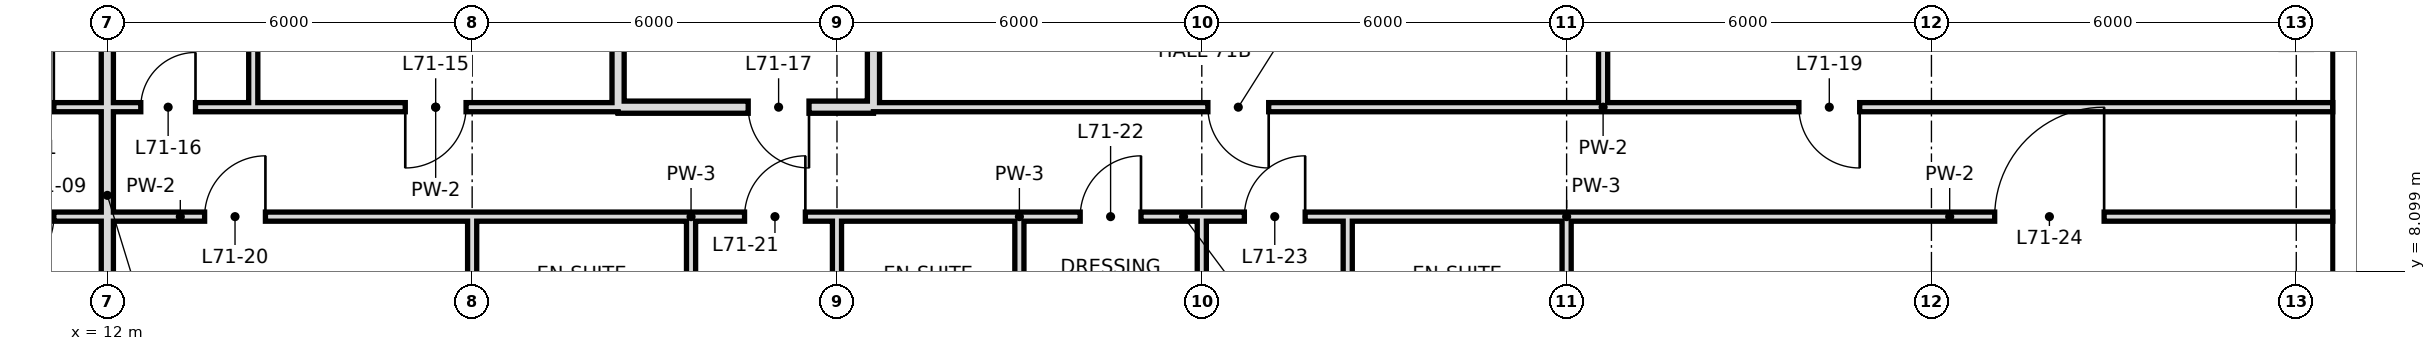
"""IFC4 building model, lengths in metres.
Left out: names, types, materials, properties, quantities, classifications, styles, units other than length and angle.
Written with IfcOpenShell. Run it as: python <this file> out.ifc"""

import sys

from ifc_helpers import new_model, si_unit, direction, frame, frame_2d, origin, place, context, subcontext, project, spatial, rectangle, extrude, element, fill, save


model = new_model("IFC4")
c1 = context("Model", 3, precision=1e-05, world=origin(), true_north=direction((0.0, 1.0)))
c2 = subcontext(c1, "Body", "Model", "MODEL_VIEW")
j1 = project(units=[si_unit("LENGTHUNIT", "METRE"), si_unit("PLANEANGLEUNIT", "RADIAN")], contexts=[c1])
p1 = place(None, origin())
s1 = spatial("IfcSite", under=j1, at=p1, CompositionType="ELEMENT")
p2 = place(p1, origin())
s2 = spatial("IfcBuilding", under=s1, at=p2, CompositionType="ELEMENT")
p3 = place(p2, frame((0.0, 0.0, 301.6)))
s3 = spatial("IfcBuildingStorey", under=s2, at=p3, CompositionType="ELEMENT", Elevation=301.6)
p4 = place(p3, frame((12.0, 0.0, 0.0), z_axis=(0.0, 0.0, 1.0), x_axis=(0.0, 1.0, 0.0)))
e1 = element("IfcWall", 1, at=p4, inside=s3, PredefinedType="SOLIDWALL", context=c2, shape_type="SweptSolid", body=[
    extrude(rectangle(XDim=18.7, YDim=0.2, at=frame_2d((9.35, 0.0))), origin(), (0.0, 0.0, 1.0), 2.72),
])
p5 = place(p3, frame((14.4, 10.8, 0.0), z_axis=(0.0, 0.0, 1.0), x_axis=(0.0, 1.0, 0.0)))
e2 = element("IfcWall", 2, at=p5, inside=s3, PredefinedType="PARTITIONING", context=c2, shape_type="SweptSolid", body=[
    extrude(rectangle(XDim=7.9, YDim=0.15, at=frame_2d((3.95, 0.0))), origin(), (0.0, 0.0, 1.0), 3.42),
])
p6 = place(p3, frame((18.0, 6.0, 0.0), z_axis=(0.0, 0.0, 1.0), x_axis=(0.0, 1.0, 0.0)))
e3 = element("IfcWall", 3, at=p6, inside=s3, PredefinedType="PARTITIONING", context=c2, shape_type="SweptSolid", body=[
    extrude(rectangle(XDim=3.0, YDim=0.15, at=frame_2d((1.5, 0.0))), origin(), (0.0, 0.0, 1.0), 2.72),
])
p7 = place(p3, frame((20.4, 10.8, 0.0), z_axis=(0.0, 0.0, 1.0), x_axis=(0.0, 1.0, 0.0)))
e4 = element("IfcWall", 4, at=p7, inside=s3, PredefinedType="SOLIDWALL", context=c2, shape_type="SweptSolid", body=[
    extrude(rectangle(XDim=7.9, YDim=0.2, at=frame_2d((3.95, 0.0))), origin(), (0.0, 0.0, 1.0), 2.72),
])
p8 = place(p3, frame((21.6, 6.0, 0.0), z_axis=(0.0, 0.0, 1.0), x_axis=(0.0, 1.0, 0.0)))
e5 = element("IfcWall", 5, at=p8, inside=s3, PredefinedType="PARTITIONING", context=c2, shape_type="SweptSolid", body=[
    extrude(rectangle(XDim=3.0, YDim=0.15, at=frame_2d((1.5, 0.0))), origin(), (0.0, 0.0, 1.0), 3.42),
])
p9 = place(p3, frame((24.0, 6.0, 0.0), z_axis=(0.0, 0.0, 1.0), x_axis=(0.0, 1.0, 0.0)))
e6 = element("IfcWall", 6, at=p9, inside=s3, PredefinedType="PARTITIONING", context=c2, shape_type="SweptSolid", body=[
    extrude(rectangle(XDim=3.0, YDim=0.15, at=frame_2d((1.5, 0.0))), origin(), (0.0, 0.0, 1.0), 2.72),
])
p10 = place(p3, frame((24.6, 10.8, 0.0), z_axis=(0.0, 0.0, 1.0), x_axis=(0.0, 1.0, 0.0)))
e7 = element("IfcWall", 7, at=p10, inside=s3, PredefinedType="SOLIDWALL", context=c2, shape_type="SweptSolid", body=[
    extrude(rectangle(XDim=7.9, YDim=0.2, at=frame_2d((3.95, 0.0))), origin(), (0.0, 0.0, 1.0), 2.72),
])
p11 = place(p3, frame((27.0, 6.0, 0.0), z_axis=(0.0, 0.0, 1.0), x_axis=(0.0, 1.0, 0.0)))
e8 = element("IfcWall", 8, at=p11, inside=s3, PredefinedType="PARTITIONING", context=c2, shape_type="SweptSolid", body=[
    extrude(rectangle(XDim=3.0, YDim=0.15, at=frame_2d((1.5, 0.0))), origin(), (0.0, 0.0, 1.0), 3.42),
])
p12 = place(p3, frame((30.0, -0.6, 0.0), z_axis=(0.0, 0.0, 1.0), x_axis=(0.0, 1.0, 0.0)))
e9 = element("IfcWall", 9, at=p12, inside=s3, PredefinedType="PARTITIONING", context=c2, shape_type="SweptSolid", body=[
    extrude(rectangle(XDim=9.6, YDim=0.15, at=frame_2d((4.8, 0.0))), origin(), (0.0, 0.0, 1.0), 2.72),
])
p13 = place(p3, frame((32.4, 6.0, 0.0), z_axis=(0.0, 0.0, 1.0), x_axis=(0.0, 1.0, 0.0)))
e10 = element("IfcWall", 10, at=p13, inside=s3, PredefinedType="PARTITIONING", context=c2, shape_type="SweptSolid", body=[
    extrude(rectangle(XDim=3.0, YDim=0.15, at=frame_2d((1.5, 0.0))), origin(), (0.0, 0.0, 1.0), 3.42),
])
p14 = place(p3, frame((36.0, 6.0, 0.0), z_axis=(0.0, 0.0, 1.0), x_axis=(0.0, 1.0, 0.0)))
e11 = element("IfcWall", 11, at=p14, inside=s3, PredefinedType="PARTITIONING", context=c2, shape_type="SweptSolid", body=[
    extrude(rectangle(XDim=3.0, YDim=0.15, at=frame_2d((1.5, 0.0))), origin(), (0.0, 0.0, 1.0), 2.72),
])
p15 = place(p3, frame((36.6, 10.8, 0.0), z_axis=(0.0, 0.0, 1.0), x_axis=(0.0, 1.0, 0.0)))
e12 = element("IfcWall", 12, at=p15, inside=s3, PredefinedType="PARTITIONING", context=c2, shape_type="SweptSolid", body=[
    extrude(rectangle(XDim=7.9, YDim=0.15, at=frame_2d((3.95, 0.0))), origin(), (0.0, 0.0, 1.0), 3.42),
])
p16 = place(p3, frame((20.4, 10.8, 0.0), z_axis=(0.0, 0.0, 1.0), x_axis=(1.0, 0.0, 0.0)))
e13 = element("IfcWall", 13, at=p16, inside=s3, PredefinedType="SOLIDWALL", context=c2, shape_type="SweptSolid", body=[
    extrude(rectangle(XDim=4.2, YDim=0.2, at=frame_2d((2.1, 0.0))), origin(), (0.0, 0.0, 1.0), 2.72),
])
p17 = place(p16, frame((2.14, 0.0, 0.0)))
e14 = element("IfcOpeningElement", 14, at=p17, cuts=e13, PredefinedType="OPENING", context=c2, shape_type="SweptSolid", body=[
    extrude(rectangle(XDim=1.0, YDim=2.4, at=frame_2d((0.5, 1.2))), frame((0.0, 0.11, 0.0), z_axis=(0.0, -1.0, 0.0), x_axis=(1.0, 0.0, 0.0)), (0.0, 0.0, 1.0), 0.22),
])
p18 = place(p3, frame((-10.2, 10.8, 0.0), z_axis=(0.0, 0.0, 1.0), x_axis=(1.0, 0.0, 0.0)))
e15 = element("IfcWall", 15, at=p18, inside=s3, PredefinedType="PARTITIONING", context=c2, shape_type="SweptSolid", body=[
    extrude(rectangle(XDim=22.2, YDim=0.15, at=frame_2d((11.1, 0.0))), origin(), (0.0, 0.0, 1.0), 3.42),
])
p19 = place(p18, frame((20.32, 0.0, 0.0)))
e16 = element("IfcOpeningElement", 16, at=p19, cuts=e15, PredefinedType="OPENING", context=c2, shape_type="SweptSolid", body=[
    extrude(rectangle(XDim=1.0, YDim=2.4, at=frame_2d((0.5, 1.2))), frame((0.0, 0.085, 0.0), z_axis=(0.0, -1.0, 0.0), x_axis=(1.0, 0.0, 0.0)), (0.0, 0.0, 1.0), 0.17),
])
p20 = place(p18, frame((3.4, 0.0, 0.0)))
e17 = element("IfcOpeningElement", 17, at=p20, cuts=e15, PredefinedType="OPENING", context=c2, shape_type="SweptSolid", body=[
    extrude(rectangle(XDim=1.0, YDim=2.4, at=frame_2d((0.5, 1.2))), frame((0.0, 0.085, 0.0), z_axis=(0.0, -1.0, 0.0), x_axis=(1.0, 0.0, 0.0)), (0.0, 0.0, 1.0), 0.17),
])
p21 = place(p18, frame((10.84, 0.0, 0.0)))
e18 = element("IfcOpeningElement", 18, at=p21, cuts=e15, PredefinedType="OPENING", context=c2, shape_type="SweptSolid", body=[
    extrude(rectangle(XDim=1.0, YDim=2.4, at=frame_2d((0.5, 1.2))), frame((0.0, 0.085, 0.0), z_axis=(0.0, -1.0, 0.0), x_axis=(1.0, 0.0, 0.0)), (0.0, 0.0, 1.0), 0.17),
])
p22 = place(p3, frame((14.4, 10.8, 0.0), z_axis=(0.0, 0.0, 1.0), x_axis=(1.0, 0.0, 0.0)))
e19 = element("IfcWall", 19, at=p22, inside=s3, PredefinedType="PARTITIONING", context=c2, shape_type="SweptSolid", body=[
    extrude(rectangle(XDim=6.0, YDim=0.15, at=frame_2d((3.0, 0.0))), origin(), (0.0, 0.0, 1.0), 3.42),
])
p23 = place(p22, frame((2.5, 0.0, 0.0)))
e20 = element("IfcOpeningElement", 20, at=p23, cuts=e19, PredefinedType="OPENING", context=c2, shape_type="SweptSolid", body=[
    extrude(rectangle(XDim=1.0, YDim=2.4, at=frame_2d((0.5, 1.2))), frame((0.0, 0.085, 0.0), z_axis=(0.0, -1.0, 0.0), x_axis=(1.0, 0.0, 0.0)), (0.0, 0.0, 1.0), 0.17),
])
p24 = place(p3, frame((24.6, 10.8, 0.0), z_axis=(0.0, 0.0, 1.0), x_axis=(1.0, 0.0, 0.0)))
e21 = element("IfcWall", 21, at=p24, inside=s3, PredefinedType="PARTITIONING", context=c2, shape_type="SweptSolid", body=[
    extrude(rectangle(XDim=24.0, YDim=0.15, at=frame_2d((12.0, 0.0))), origin(), (0.0, 0.0, 1.0), 3.42),
])
p25 = place(p24, frame((5.5, 0.0, 0.0)))
e22 = element("IfcOpeningElement", 22, at=p25, cuts=e21, PredefinedType="OPENING", context=c2, shape_type="SweptSolid", body=[
    extrude(rectangle(XDim=1.0, YDim=2.4, at=frame_2d((0.5, 1.2))), frame((0.0, 0.085, 0.0), z_axis=(0.0, -1.0, 0.0), x_axis=(1.0, 0.0, 0.0)), (0.0, 0.0, 1.0), 0.17),
])
p26 = place(p24, frame((15.22, 0.0, 0.0)))
e23 = element("IfcOpeningElement", 23, at=p26, cuts=e21, PredefinedType="OPENING", context=c2, shape_type="SweptSolid", body=[
    extrude(rectangle(XDim=1.0, YDim=2.4, at=frame_2d((0.5, 1.2))), frame((0.0, 0.085, 0.0), z_axis=(0.0, -1.0, 0.0), x_axis=(1.0, 0.0, 0.0)), (0.0, 0.0, 1.0), 0.17),
])
p27 = place(p3, frame((12.0, 10.8, 0.0), z_axis=(0.0, 0.0, 1.0), x_axis=(1.0, 0.0, 0.0)))
e24 = element("IfcWall", 24, at=p27, inside=s3, PredefinedType="PARTITIONING", context=c2, shape_type="SweptSolid", body=[
    extrude(rectangle(XDim=2.4, YDim=0.15, at=frame_2d((1.2, 0.0))), origin(), (0.0, 0.0, 1.0), 3.42),
])
p28 = place(p27, frame((0.55, 0.0, 0.0)))
e25 = element("IfcOpeningElement", 25, at=p28, cuts=e24, PredefinedType="OPENING", context=c2, shape_type="SweptSolid", body=[
    extrude(rectangle(XDim=0.9, YDim=2.4, at=frame_2d((0.45, 1.2))), frame((0.0, 0.085, 0.0), z_axis=(0.0, -1.0, 0.0), x_axis=(1.0, 0.0, 0.0)), (0.0, 0.0, 1.0), 0.17),
])
p29 = place(p3, frame((8.4, 9.0, 0.0), z_axis=(0.0, 0.0, 1.0), x_axis=(1.0, 0.0, 0.0)))
e26 = element("IfcWall", 26, at=p29, inside=s3, PredefinedType="PARTITIONING", context=c2, shape_type="SweptSolid", body=[
    extrude(rectangle(XDim=9.6, YDim=0.15, at=frame_2d((4.8, 0.0))), origin(), (0.0, 0.0, 1.0), 3.42),
])
p30 = place(p29, frame((1.72, 0.0, 0.0)))
e27 = element("IfcOpeningElement", 27, at=p30, cuts=e26, PredefinedType="OPENING", context=c2, shape_type="SweptSolid", body=[
    extrude(rectangle(XDim=1.0, YDim=2.4, at=frame_2d((0.5, 1.2))), frame((0.0, 0.085, 0.0), z_axis=(0.0, -1.0, 0.0), x_axis=(1.0, 0.0, 0.0)), (0.0, 0.0, 1.0), 0.17),
])
p31 = place(p29, frame((5.2, 0.0, 0.0)))
e28 = element("IfcOpeningElement", 28, at=p31, cuts=e26, PredefinedType="OPENING", context=c2, shape_type="SweptSolid", body=[
    extrude(rectangle(XDim=1.0, YDim=2.4, at=frame_2d((0.5, 1.2))), frame((0.0, 0.085, 0.0), z_axis=(0.0, -1.0, 0.0), x_axis=(1.0, 0.0, 0.0)), (0.0, 0.0, 1.0), 0.17),
])
p32 = place(p3, frame((21.6, 9.0, 0.0), z_axis=(0.0, 0.0, 1.0), x_axis=(1.0, 0.0, 0.0)))
e29 = element("IfcWall", 29, at=p32, inside=s3, PredefinedType="PARTITIONING", context=c2, shape_type="SweptSolid", body=[
    extrude(rectangle(XDim=2.4, YDim=0.15, at=frame_2d((1.2, 0.0))), origin(), (0.0, 0.0, 1.0), 3.42),
])
p33 = place(p32, frame((0.88, 0.0, 0.0)))
e30 = element("IfcOpeningElement", 30, at=p33, cuts=e29, PredefinedType="OPENING", context=c2, shape_type="SweptSolid", body=[
    extrude(rectangle(XDim=1.0, YDim=2.4, at=frame_2d((0.5, 1.2))), frame((0.0, 0.085, 0.0), z_axis=(0.0, -1.0, 0.0), x_axis=(1.0, 0.0, 0.0)), (0.0, 0.0, 1.0), 0.17),
])
p34 = place(p3, frame((27.0, 9.0, 0.0), z_axis=(0.0, 0.0, 1.0), x_axis=(1.0, 0.0, 0.0)))
e31 = element("IfcWall", 31, at=p34, inside=s3, PredefinedType="PARTITIONING", context=c2, shape_type="SweptSolid", body=[
    extrude(rectangle(XDim=5.4, YDim=0.15, at=frame_2d((2.7, 0.0))), origin(), (0.0, 0.0, 1.0), 3.42),
])
p35 = place(p34, frame((1.0, 0.0, 0.0)))
e32 = element("IfcOpeningElement", 32, at=p35, cuts=e31, PredefinedType="OPENING", context=c2, shape_type="SweptSolid", body=[
    extrude(rectangle(XDim=1.0, YDim=2.4, at=frame_2d((0.5, 1.2))), frame((0.0, 0.085, 0.0), z_axis=(0.0, -1.0, 0.0), x_axis=(1.0, 0.0, 0.0)), (0.0, 0.0, 1.0), 0.17),
])
p36 = place(p34, frame((3.7, 0.0, 0.0)))
e33 = element("IfcOpeningElement", 33, at=p36, cuts=e31, PredefinedType="OPENING", context=c2, shape_type="SweptSolid", body=[
    extrude(rectangle(XDim=1.0, YDim=2.4, at=frame_2d((0.5, 1.2))), frame((0.0, 0.085, 0.0), z_axis=(0.0, -1.0, 0.0), x_axis=(1.0, 0.0, 0.0)), (0.0, 0.0, 1.0), 0.17),
])
p37 = place(p3, frame((36.0, 9.0, 0.0), z_axis=(0.0, 0.0, 1.0), x_axis=(1.0, 0.0, 0.0)))
e34 = element("IfcWall", 34, at=p37, inside=s3, PredefinedType="PARTITIONING", context=c2, shape_type="SweptSolid", body=[
    extrude(rectangle(XDim=12.6, YDim=0.15, at=frame_2d((6.3, 0.0))), origin(), (0.0, 0.0, 1.0), 3.42),
])
p38 = place(p37, frame((7.04, 0.0, 0.0)))
e35 = element("IfcOpeningElement", 35, at=p38, cuts=e34, PredefinedType="OPENING", context=c2, shape_type="SweptSolid", body=[
    extrude(rectangle(XDim=1.8, YDim=2.4, at=frame_2d((0.9, 1.2))), frame((0.0, 0.085, 0.0), z_axis=(0.0, -1.0, 0.0), x_axis=(1.0, 0.0, 0.0)), (0.0, 0.0, 1.0), 0.17),
])
p39 = place(p3, frame((18.0, 9.0, 0.0), z_axis=(0.0, 0.0, 1.0), x_axis=(1.0, 0.0, 0.0)))
e36 = element("IfcWall", 36, at=p39, inside=s3, PredefinedType="PARTITIONING", context=c2, shape_type="SweptSolid", body=[
    extrude(rectangle(XDim=3.6, YDim=0.15, at=frame_2d((1.8, 0.0))), origin(), (0.0, 0.0, 1.0), 3.42),
])
p40 = place(p3, frame((24.0, 9.0, 0.0), z_axis=(0.0, 0.0, 1.0), x_axis=(1.0, 0.0, 0.0)))
e37 = element("IfcWall", 37, at=p40, inside=s3, PredefinedType="PARTITIONING", context=c2, shape_type="SweptSolid", body=[
    extrude(rectangle(XDim=3.0, YDim=0.15, at=frame_2d((1.5, 0.0))), origin(), (0.0, 0.0, 1.0), 3.42),
])
p41 = place(p3, frame((32.4, 9.0, 0.0), z_axis=(0.0, 0.0, 1.0), x_axis=(1.0, 0.0, 0.0)))
e38 = element("IfcWall", 38, at=p41, inside=s3, PredefinedType="PARTITIONING", context=c2, shape_type="SweptSolid", body=[
    extrude(rectangle(XDim=3.6, YDim=0.15, at=frame_2d((1.8, 0.0))), origin(), (0.0, 0.0, 1.0), 3.42),
])
p42 = place(p19, frame((1.0, 0.0, 0.0), z_axis=(0.0, 0.0, 1.0), x_axis=(-1.0, 0.0, 0.0)))
e39 = element("IfcDoor", 39, at=p42, inside=s3, OperationType="SINGLE_SWING_LEFT", PredefinedType="DOOR", context=c2, shape_type="SweptSolid", body=[
    extrude(rectangle(XDim=1.0, YDim=2.4, at=frame_2d((0.5, 1.2))), frame((0.0, 0.025, 0.0), z_axis=(0.0, -1.0, 0.0), x_axis=(1.0, 0.0, 0.0)), (0.0, 0.0, 1.0), 0.05),
])
fill(e16, e39)
p43 = place(p30, frame((1.0, 0.0, 0.0), z_axis=(0.0, 0.0, 1.0), x_axis=(-1.0, 0.0, 0.0)))
e40 = element("IfcDoor", 40, at=p43, inside=s3, OperationType="SINGLE_SWING_RIGHT", PredefinedType="DOOR", context=c2, shape_type="SweptSolid", body=[
    extrude(rectangle(XDim=1.0, YDim=2.4, at=frame_2d((0.5, 1.2))), frame((0.0, 0.025, 0.0), z_axis=(0.0, -1.0, 0.0), x_axis=(1.0, 0.0, 0.0)), (0.0, 0.0, 1.0), 0.05),
])
fill(e27, e40)
p44 = place(p23, frame((1.0, 0.0, 0.0), z_axis=(0.0, 0.0, 1.0), x_axis=(-1.0, 0.0, 0.0)))
e41 = element("IfcDoor", 41, at=p44, inside=s3, OperationType="SINGLE_SWING_RIGHT", PredefinedType="DOOR", context=c2, shape_type="SweptSolid", body=[
    extrude(rectangle(XDim=1.0, YDim=2.4, at=frame_2d((0.5, 1.2))), frame((0.0, 0.025, 0.0), z_axis=(0.0, -1.0, 0.0), x_axis=(1.0, 0.0, 0.0)), (0.0, 0.0, 1.0), 0.05),
])
fill(e20, e41)
p45 = place(p28, frame((0.9, 0.0, 0.0), z_axis=(0.0, 0.0, 1.0), x_axis=(-1.0, 0.0, 0.0)))
e42 = element("IfcDoor", 42, at=p45, inside=s3, OperationType="SINGLE_SWING_LEFT", PredefinedType="DOOR", context=c2, shape_type="SweptSolid", body=[
    extrude(rectangle(XDim=0.9, YDim=2.4, at=frame_2d((0.45, 1.2))), frame((0.0, 0.025, 0.0), z_axis=(0.0, -1.0, 0.0), x_axis=(1.0, 0.0, 0.0)), (0.0, 0.0, 1.0), 0.05),
])
fill(e25, e42)
p46 = place(p17, origin())
e43 = element("IfcDoor", 43, at=p46, inside=s3, OperationType="SINGLE_SWING_RIGHT", PredefinedType="DOOR", context=c2, shape_type="SweptSolid", body=[
    extrude(rectangle(XDim=1.0, YDim=2.4, at=frame_2d((0.5, 1.2))), frame((0.0, 0.025, 0.0), z_axis=(0.0, -1.0, 0.0), x_axis=(1.0, 0.0, 0.0)), (0.0, 0.0, 1.0), 0.05),
])
fill(e14, e43)
p47 = place(p25, origin())
e44 = element("IfcDoor", 44, at=p47, inside=s3, OperationType="SINGLE_SWING_RIGHT", PredefinedType="DOOR", context=c2, shape_type="SweptSolid", body=[
    extrude(rectangle(XDim=1.0, YDim=2.4, at=frame_2d((0.5, 1.2))), frame((0.0, 0.025, 0.0), z_axis=(0.0, -1.0, 0.0), x_axis=(1.0, 0.0, 0.0)), (0.0, 0.0, 1.0), 0.05),
])
fill(e22, e44)
p48 = place(p26, origin())
e45 = element("IfcDoor", 45, at=p48, inside=s3, OperationType="SINGLE_SWING_RIGHT", PredefinedType="DOOR", context=c2, shape_type="SweptSolid", body=[
    extrude(rectangle(XDim=1.0, YDim=2.4, at=frame_2d((0.5, 1.2))), frame((0.0, 0.025, 0.0), z_axis=(0.0, -1.0, 0.0), x_axis=(1.0, 0.0, 0.0)), (0.0, 0.0, 1.0), 0.05),
])
fill(e23, e45)
p49 = place(p31, frame((1.0, 0.0, 0.0), z_axis=(0.0, 0.0, 1.0), x_axis=(-1.0, 0.0, 0.0)))
e46 = element("IfcDoor", 46, at=p49, inside=s3, OperationType="SINGLE_SWING_LEFT", PredefinedType="DOOR", context=c2, shape_type="SweptSolid", body=[
    extrude(rectangle(XDim=1.0, YDim=2.4, at=frame_2d((0.5, 1.2))), frame((0.0, 0.025, 0.0), z_axis=(0.0, -1.0, 0.0), x_axis=(1.0, 0.0, 0.0)), (0.0, 0.0, 1.0), 0.05),
])
fill(e28, e46)
p50 = place(p33, frame((1.0, 0.0, 0.0), z_axis=(0.0, 0.0, 1.0), x_axis=(-1.0, 0.0, 0.0)))
e47 = element("IfcDoor", 47, at=p50, inside=s3, OperationType="SINGLE_SWING_LEFT", PredefinedType="DOOR", context=c2, shape_type="SweptSolid", body=[
    extrude(rectangle(XDim=1.0, YDim=2.4, at=frame_2d((0.5, 1.2))), frame((0.0, 0.025, 0.0), z_axis=(0.0, -1.0, 0.0), x_axis=(1.0, 0.0, 0.0)), (0.0, 0.0, 1.0), 0.05),
])
fill(e30, e47)
p51 = place(p35, frame((1.0, 0.0, 0.0), z_axis=(0.0, 0.0, 1.0), x_axis=(-1.0, 0.0, 0.0)))
e48 = element("IfcDoor", 48, at=p51, inside=s3, OperationType="SINGLE_SWING_LEFT", PredefinedType="DOOR", context=c2, shape_type="SweptSolid", body=[
    extrude(rectangle(XDim=1.0, YDim=2.4, at=frame_2d((0.5, 1.2))), frame((0.0, 0.025, 0.0), z_axis=(0.0, -1.0, 0.0), x_axis=(1.0, 0.0, 0.0)), (0.0, 0.0, 1.0), 0.05),
])
fill(e32, e48)
p52 = place(p36, frame((1.0, 0.0, 0.0), z_axis=(0.0, 0.0, 1.0), x_axis=(-1.0, 0.0, 0.0)))
e49 = element("IfcDoor", 49, at=p52, inside=s3, OperationType="SINGLE_SWING_LEFT", PredefinedType="DOOR", context=c2, shape_type="SweptSolid", body=[
    extrude(rectangle(XDim=1.0, YDim=2.4, at=frame_2d((0.5, 1.2))), frame((0.0, 0.025, 0.0), z_axis=(0.0, -1.0, 0.0), x_axis=(1.0, 0.0, 0.0)), (0.0, 0.0, 1.0), 0.05),
])
fill(e33, e49)
p53 = place(p38, frame((1.8, 0.0, 0.0), z_axis=(0.0, 0.0, 1.0), x_axis=(-1.0, 0.0, 0.0)))
e50 = element("IfcDoor", 50, at=p53, inside=s3, OperationType="SINGLE_SWING_LEFT", PredefinedType="DOOR", context=c2, shape_type="SweptSolid", body=[
    extrude(rectangle(XDim=1.8, YDim=2.4, at=frame_2d((0.9, 1.2))), frame((0.0, 0.025, 0.0), z_axis=(0.0, -1.0, 0.0), x_axis=(1.0, 0.0, 0.0)), (0.0, 0.0, 1.0), 0.05),
])
fill(e35, e50)
save(model, sys.argv[1])
